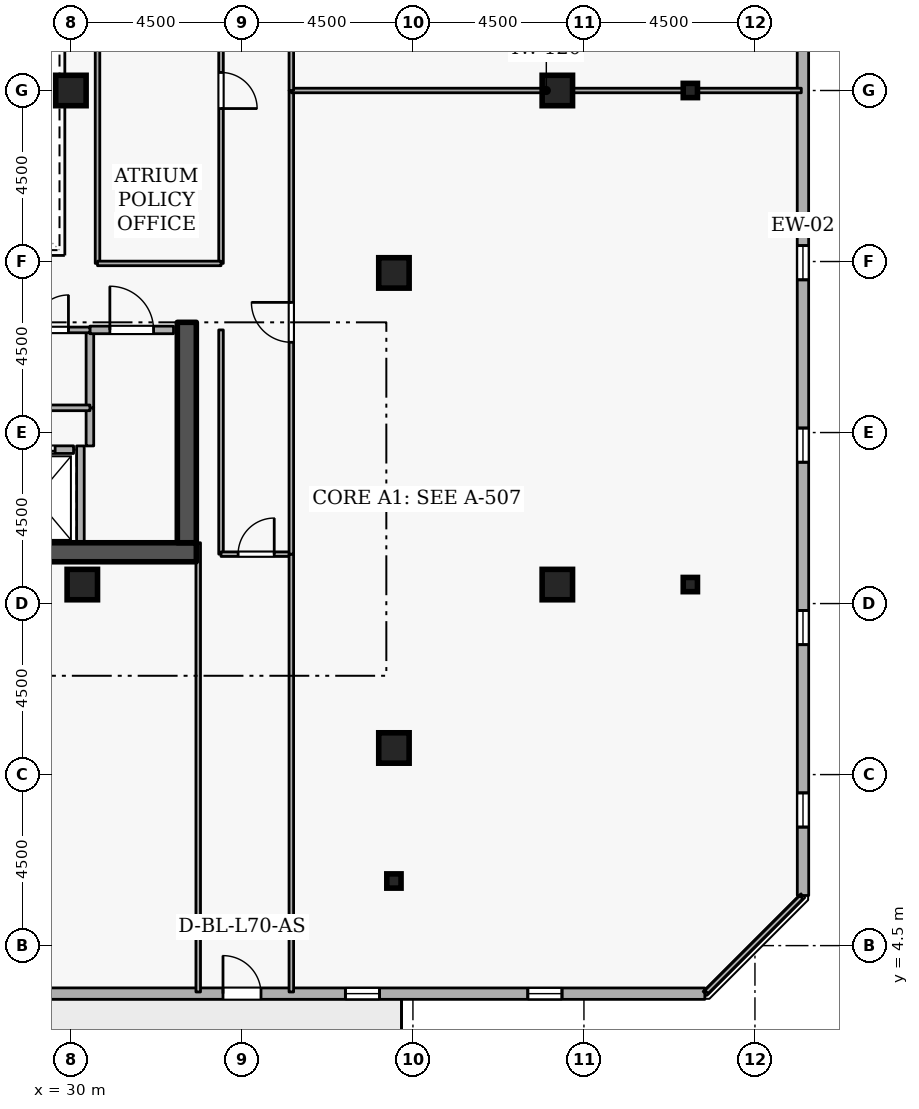
"""IFC4 building model, lengths in metres.
Left out: names, types, materials, properties, quantities, classifications, styles, units other than length and angle.
Written with IfcOpenShell. Run it as: python <this file> out.ifc"""

import sys

from ifc_helpers import new_model, si_unit, direction, frame, frame_2d, origin, origin_2d, place, context, subcontext, project, spatial, rectangle, i_section, extrude, element, fill, save


model = new_model("IFC4")
c1 = context("Model", 3, precision=1e-05, world=origin(), true_north=direction((0.0, 1.0)))
c2 = subcontext(c1, "Body", "Model", "MODEL_VIEW")
j1 = project(units=[si_unit("LENGTHUNIT", "METRE"), si_unit("PLANEANGLEUNIT", "RADIAN")], contexts=[c1])
p1 = place(None, origin())
s1 = spatial("IfcSite", under=j1, at=p1, CompositionType="ELEMENT")
p2 = place(p1, origin())
s2 = spatial("IfcBuilding", under=s1, at=p2, CompositionType="ELEMENT")
p3 = place(p2, frame((0.0, 0.0, 261.9)))
s3 = spatial("IfcBuildingStorey", under=s2, at=p3, CompositionType="ELEMENT", Elevation=261.9)
p4 = place(p3, frame((17.7, 14.85, 0.0), z_axis=(0.0, 0.0, 1.0), x_axis=(1.0, 0.0, 0.0)))
e1 = element("IfcWall", 1, at=p4, inside=s3, PredefinedType="SHEAR", context=c2, shape_type="SweptSolid", body=[
    extrude(rectangle(XDim=15.6, YDim=0.5, at=frame_2d((7.8, 0.0))), origin(), (0.0, 0.0, 1.0), 3.6),
])
p5 = place(p3, frame((33.05, 15.1, 0.0), z_axis=(0.0, 0.0, 1.0), x_axis=(0.0, 1.0, 0.0)))
e2 = element("IfcWall", 2, at=p5, inside=s3, PredefinedType="SHEAR", context=c2, shape_type="SweptSolid", body=[
    extrude(rectangle(XDim=5.8, YDim=0.5, at=frame_2d((2.9, 0.0))), origin(), (0.0, 0.0, 1.0), 3.6),
])
for number, where, z_axis, x_axis in (
    (3, (38.5, 9.7, 0.0), (0.0, 0.0, 1.0), (1.0, 0.0, 0.0)),
    (4, (42.8, 14.0, 0.0), (0.0, 0.0, 1.0), (1.0, 0.0, 0.0)),
    (5, (42.8, 27.0, 0.0), (0.0, 0.0, 1.0), (1.0, 0.0, 0.0)),
    (6, (38.5, 22.2, 0.0), (0.0, 0.0, 1.0), (1.0, 0.0, 0.0)),
    (7, (30.3, 14.0, 0.0), (0.0, 0.0, 1.0), (1.0, 0.0, 0.0)),
    (8, (30.0, 27.0, 0.0), (0.0, 0.0, 1.0), (1.0, 0.0, 0.0)),
):
    element("IfcColumn", number, at=place(p3, frame(where, z_axis=z_axis, x_axis=x_axis)), inside=s3, PredefinedType="COLUMN", context=c2, shape_type="SweptSolid", body=[
        extrude(rectangle(XDim=0.8, YDim=0.8, at=origin_2d()), origin(), (0.0, 0.0, 1.0), 3.6),
    ])
for number, where, z_axis, x_axis in (
    (9, (38.5, 6.2, 0.0), (0.0, 0.0, 1.0), (1.0, 0.0, 0.0)),
    (10, (46.3, 14.0, 0.0), (0.0, 0.0, 1.0), (1.0, 0.0, 0.0)),
    (11, (46.3, 27.0, 0.0), (0.0, 0.0, 1.0), (1.0, 0.0, 0.0)),
):
    element("IfcColumn", number, at=place(p3, frame(where, z_axis=z_axis, x_axis=x_axis)), inside=s3, PredefinedType="COLUMN", context=c2, shape_type="SweptSolid", body=[
        extrude(i_section(OverallWidth=0.375, OverallDepth=0.375, WebThickness=0.017, FlangeThickness=0.027, FilletRadius=0.015, at=origin_2d()), origin(), (0.0, 0.0, 1.0), 3.6),
    ])
p6 = place(p3, frame((11.422, 3.239, 0.0), z_axis=(0.0, 0.0, 1.0), x_axis=(0.999999994606, -0.000103863011, 0.0)))
e12 = element("IfcWall", 12, at=p6, inside=s3, PredefinedType="STANDARD", context=c2, shape_type="SweptSolid", body=[
    extrude(rectangle(XDim=35.259, YDim=0.3, at=frame_2d((17.629, 0.0))), origin(), (0.0, 0.0, 1.0), 2.7),
])
p7 = place(p6, frame((22.58, 0.0, 0.0)))
e13 = element("IfcOpeningElement", 13, at=p7, cuts=e12, PredefinedType="OPENING", context=c2, shape_type="SweptSolid", body=[
    extrude(rectangle(XDim=1.0, YDim=2.08, at=frame_2d((0.5, 1.04))), frame((0.0, 0.16, 0.0), z_axis=(0.0, -1.0, 0.0), x_axis=(1.0, 0.0, 0.0)), (0.0, 0.0, 1.0), 0.32),
])
p8 = place(p6, frame((1.8, 0.0, 0.72)))
e14 = element("IfcOpeningElement", 14, at=p8, cuts=e12, PredefinedType="OPENING", context=c2, shape_type="SweptSolid", body=[
    extrude(rectangle(XDim=0.9, YDim=1.75, at=frame_2d((0.45, 0.875))), frame((0.0, 0.16, 0.0), z_axis=(0.0, -1.0, 0.0), x_axis=(1.0, 0.0, 0.0)), (0.0, 0.0, 1.0), 0.32),
])
p9 = place(p6, frame((6.6, 0.0, 0.72)))
e15 = element("IfcOpeningElement", 15, at=p9, cuts=e12, PredefinedType="OPENING", context=c2, shape_type="SweptSolid", body=[
    extrude(rectangle(XDim=0.9, YDim=1.75, at=frame_2d((0.45, 0.875))), frame((0.0, 0.16, 0.0), z_axis=(0.0, -1.0, 0.0), x_axis=(1.0, 0.0, 0.0)), (0.0, 0.0, 1.0), 0.32),
])
p10 = place(p6, frame((11.4, 0.0, 0.72)))
e16 = element("IfcOpeningElement", 16, at=p10, cuts=e12, PredefinedType="OPENING", context=c2, shape_type="SweptSolid", body=[
    extrude(rectangle(XDim=0.9, YDim=1.75, at=frame_2d((0.45, 0.875))), frame((0.0, 0.16, 0.0), z_axis=(0.0, -1.0, 0.0), x_axis=(1.0, 0.0, 0.0)), (0.0, 0.0, 1.0), 0.32),
])
p11 = place(p6, frame((16.2, 0.0, 0.72)))
e17 = element("IfcOpeningElement", 17, at=p11, cuts=e12, PredefinedType="OPENING", context=c2, shape_type="SweptSolid", body=[
    extrude(rectangle(XDim=0.9, YDim=1.75, at=frame_2d((0.45, 0.875))), frame((0.0, 0.16, 0.0), z_axis=(0.0, -1.0, 0.0), x_axis=(1.0, 0.0, 0.0)), (0.0, 0.0, 1.0), 0.32),
])
p12 = place(p6, frame((25.8, 0.0, 0.72)))
e18 = element("IfcOpeningElement", 18, at=p12, cuts=e12, PredefinedType="OPENING", context=c2, shape_type="SweptSolid", body=[
    extrude(rectangle(XDim=0.9, YDim=1.75, at=frame_2d((0.45, 0.875))), frame((0.0, 0.16, 0.0), z_axis=(0.0, -1.0, 0.0), x_axis=(1.0, 0.0, 0.0)), (0.0, 0.0, 1.0), 0.32),
])
p13 = place(p6, frame((30.6, 0.0, 0.72)))
e19 = element("IfcOpeningElement", 19, at=p13, cuts=e12, PredefinedType="OPENING", context=c2, shape_type="SweptSolid", body=[
    extrude(rectangle(XDim=0.9, YDim=1.75, at=frame_2d((0.45, 0.875))), frame((0.0, 0.16, 0.0), z_axis=(0.0, -1.0, 0.0), x_axis=(1.0, 0.0, 0.0)), (0.0, 0.0, 1.0), 0.32),
])
p14 = place(p3, frame((49.265, 5.819, 0.0), z_axis=(0.0, 0.0, 1.0), x_axis=(-0.000103863011, 0.999999994606, 0.0)))
e20 = element("IfcWall", 20, at=p14, inside=s3, PredefinedType="STANDARD", context=c2, shape_type="SweptSolid", body=[
    extrude(rectangle(XDim=35.259, YDim=0.3, at=frame_2d((17.629, 0.0))), origin(), (0.0, 0.0, 1.0), 2.7),
])
p15 = place(p14, frame((1.8, 0.0, 0.72)))
e21 = element("IfcOpeningElement", 21, at=p15, cuts=e20, PredefinedType="OPENING", context=c2, shape_type="SweptSolid", body=[
    extrude(rectangle(XDim=0.9, YDim=1.75, at=frame_2d((0.45, 0.875))), frame((0.0, 0.16, 0.0), z_axis=(0.0, -1.0, 0.0), x_axis=(1.0, 0.0, 0.0)), (0.0, 0.0, 1.0), 0.32),
])
p16 = place(p14, frame((6.6, 0.0, 0.72)))
e22 = element("IfcOpeningElement", 22, at=p16, cuts=e20, PredefinedType="OPENING", context=c2, shape_type="SweptSolid", body=[
    extrude(rectangle(XDim=0.9, YDim=1.75, at=frame_2d((0.45, 0.875))), frame((0.0, 0.16, 0.0), z_axis=(0.0, -1.0, 0.0), x_axis=(1.0, 0.0, 0.0)), (0.0, 0.0, 1.0), 0.32),
])
p17 = place(p14, frame((11.4, 0.0, 0.72)))
e23 = element("IfcOpeningElement", 23, at=p17, cuts=e20, PredefinedType="OPENING", context=c2, shape_type="SweptSolid", body=[
    extrude(rectangle(XDim=0.9, YDim=1.75, at=frame_2d((0.45, 0.875))), frame((0.0, 0.16, 0.0), z_axis=(0.0, -1.0, 0.0), x_axis=(1.0, 0.0, 0.0)), (0.0, 0.0, 1.0), 0.32),
])
p18 = place(p14, frame((16.2, 0.0, 0.72)))
e24 = element("IfcOpeningElement", 24, at=p18, cuts=e20, PredefinedType="OPENING", context=c2, shape_type="SweptSolid", body=[
    extrude(rectangle(XDim=0.9, YDim=1.75, at=frame_2d((0.45, 0.875))), frame((0.0, 0.16, 0.0), z_axis=(0.0, -1.0, 0.0), x_axis=(1.0, 0.0, 0.0)), (0.0, 0.0, 1.0), 0.32),
])
p19 = place(p14, frame((25.8, 0.0, 0.72)))
e25 = element("IfcOpeningElement", 25, at=p19, cuts=e20, PredefinedType="OPENING", context=c2, shape_type="SweptSolid", body=[
    extrude(rectangle(XDim=0.9, YDim=1.75, at=frame_2d((0.45, 0.875))), frame((0.0, 0.16, 0.0), z_axis=(0.0, -1.0, 0.0), x_axis=(1.0, 0.0, 0.0)), (0.0, 0.0, 1.0), 0.32),
])
p20 = place(p14, frame((30.6, 0.0, 0.72)))
e26 = element("IfcOpeningElement", 26, at=p20, cuts=e20, PredefinedType="OPENING", context=c2, shape_type="SweptSolid", body=[
    extrude(rectangle(XDim=0.9, YDim=1.75, at=frame_2d((0.45, 0.875))), frame((0.0, 0.16, 0.0), z_axis=(0.0, -1.0, 0.0), x_axis=(1.0, 0.0, 0.0)), (0.0, 0.0, 1.0), 0.32),
])
p21 = place(p3, frame((28.08, 17.55, 0.0), z_axis=(0.0, 0.0, 1.0), x_axis=(1.0, 0.0, 0.0)))
e27 = element("IfcWall", 27, at=p21, inside=s3, PredefinedType="STANDARD", context=c2, shape_type="SweptSolid", body=[
    extrude(rectangle(XDim=1.99, YDim=0.2, at=frame_2d((0.995, 0.0))), origin(), (0.0, 0.0, 1.0), 3.34),
])
p22 = place(p21, frame((0.485, 0.0, 0.0)))
e28 = element("IfcOpeningElement", 28, at=p22, cuts=e27, PredefinedType="OPENING", context=c2, shape_type="SweptSolid", body=[
    extrude(rectangle(XDim=1.02, YDim=2.06, at=frame_2d((0.51, 1.03))), frame((0.0, 0.11, 0.0), z_axis=(0.0, -1.0, 0.0), x_axis=(1.0, 0.0, 0.0)), (0.0, 0.0, 1.0), 0.22),
])
p23 = place(p3, frame((30.25, 15.112, 0.0), z_axis=(0.0, 0.0, 1.0), x_axis=(0.0, 1.0, 0.0)))
e29 = element("IfcWall", 29, at=p23, inside=s3, PredefinedType="STANDARD", context=c2, shape_type="SweptSolid", body=[
    extrude(rectangle(XDim=2.536, YDim=0.2, at=frame_2d((1.268, 0.0))), origin(), (0.0, 0.0, 1.0), 3.34),
])
p24 = place(p3, frame((30.5, 17.648, 0.0), z_axis=(0.0, 0.0, 1.0), x_axis=(0.0, 1.0, 0.0)))
e30 = element("IfcWall", 30, at=p24, inside=s3, PredefinedType="STANDARD", context=c2, shape_type="SweptSolid", body=[
    extrude(rectangle(XDim=1.002, YDim=0.2, at=frame_2d((0.501, 0.0))), origin(), (0.0, 0.0, 1.0), 3.34),
])
p25 = place(p3, frame((30.5, 18.65, 0.0), z_axis=(0.0, 0.0, 1.0), x_axis=(0.0, 1.0, 0.0)))
e31 = element("IfcWall", 31, at=p25, inside=s3, PredefinedType="STANDARD", context=c2, shape_type="SweptSolid", body=[
    extrude(rectangle(XDim=2.05, YDim=0.2, at=frame_2d((1.025, 0.0))), origin(), (0.0, 0.0, 1.0), 3.34),
])
p26 = place(p3, frame((30.5, 20.7, 0.0), z_axis=(0.0, 0.0, 1.0), x_axis=(1.0, 0.0, 0.0)))
e32 = element("IfcWall", 32, at=p26, inside=s3, PredefinedType="STANDARD", context=c2, shape_type="SweptSolid", body=[
    extrude(rectangle(XDim=2.2, YDim=0.2, at=frame_2d((1.1, 0.0))), origin(), (0.0, 0.0, 1.0), 3.34),
])
p27 = place(p26, frame((0.525, 0.0, 0.0)))
e33 = element("IfcOpeningElement", 33, at=p27, cuts=e32, PredefinedType="OPENING", context=c2, shape_type="SweptSolid", body=[
    extrude(rectangle(XDim=1.15, YDim=2.1, at=frame_2d((0.575, 1.05))), frame((0.0, 0.11, 0.0), z_axis=(0.0, -1.0, 0.0), x_axis=(1.0, 0.0, 0.0)), (0.0, 0.0, 1.0), 0.22),
])
p28 = place(p3, frame((30.5, 18.65, 0.0), z_axis=(0.0, 0.0, 1.0), x_axis=(-1.0, 0.0, 0.0)))
e34 = element("IfcWall", 34, at=p28, inside=s3, PredefinedType="PARTITIONING", context=c2, shape_type="SweptSolid", body=[
    extrude(rectangle(XDim=2.05, YDim=0.15, at=frame_2d((1.025, 0.0))), origin(), (0.0, 0.0, 1.0), 3.34),
])
p29 = place(p3, frame((28.45, 20.7, 0.0), z_axis=(0.0, 0.0, 1.0), x_axis=(1.0, 0.0, 0.0)))
e35 = element("IfcWall", 35, at=p29, inside=s3, PredefinedType="PARTITIONING", context=c2, shape_type="SweptSolid", body=[
    extrude(rectangle(XDim=2.05, YDim=0.15, at=frame_2d((1.025, 0.0))), origin(), (0.0, 0.0, 1.0), 3.34),
])
p30 = place(p29, frame((0.565, 0.0, 0.0)))
e36 = element("IfcOpeningElement", 36, at=p30, cuts=e35, PredefinedType="OPENING", context=c2, shape_type="SweptSolid", body=[
    extrude(rectangle(XDim=0.92, YDim=2.08, at=frame_2d((0.46, 1.04))), frame((0.0, 0.085, 0.0), z_axis=(0.0, -1.0, 0.0), x_axis=(1.0, 0.0, 0.0)), (0.0, 0.0, 1.0), 0.17),
])
p31 = place(p3, frame((33.95, 20.7, 0.0), z_axis=(0.0, 0.0, 1.0), x_axis=(0.0, -1.0, 0.0)))
e37 = element("IfcWall", 37, at=p31, inside=s3, PredefinedType="PARTITIONING", context=c2, shape_type="SweptSolid", body=[
    extrude(rectangle(XDim=5.9, YDim=0.12, at=frame_2d((2.95, 0.0))), origin(), (0.0, 0.0, 1.0), 3.34),
])
p32 = place(p3, frame((33.95, 14.8, 0.0), z_axis=(0.0, 0.0, 1.0), x_axis=(1.0, 0.0, 0.0)))
e38 = element("IfcWall", 38, at=p32, inside=s3, PredefinedType="PARTITIONING", context=c2, shape_type="SweptSolid", body=[
    extrude(rectangle(XDim=1.85, YDim=0.12, at=frame_2d((0.925, 0.0))), origin(), (0.0, 0.0, 1.0), 3.34),
])
p33 = place(p32, frame((0.45, 0.0, 0.0)))
e39 = element("IfcOpeningElement", 39, at=p33, cuts=e38, PredefinedType="OPENING", context=c2, shape_type="SweptSolid", body=[
    extrude(rectangle(XDim=0.95, YDim=2.1, at=frame_2d((0.475, 1.05))), frame((0.0, 0.07, 0.0), z_axis=(0.0, -1.0, 0.0), x_axis=(1.0, 0.0, 0.0)), (0.0, 0.0, 1.0), 0.14),
])
p34 = place(p3, frame((35.8, 14.8, 0.0), z_axis=(0.0, 0.0, 1.0), x_axis=(0.0, -1.0, 0.0)))
e40 = element("IfcWall", 40, at=p34, inside=s3, PredefinedType="PARTITIONING", context=c2, shape_type="SweptSolid", body=[
    extrude(rectangle(XDim=11.52, YDim=0.12, at=frame_2d((5.76, 0.0))), origin(), (0.0, 0.0, 1.0), 3.34),
])
p35 = place(p3, frame((33.35, 3.28, 0.0), z_axis=(0.0, 0.0, 1.0), x_axis=(0.0, 1.0, 0.0)))
e41 = element("IfcWall", 41, at=p35, inside=s3, PredefinedType="PARTITIONING", context=c2, shape_type="SweptSolid", body=[
    extrude(rectangle(XDim=11.82, YDim=0.12, at=frame_2d((5.91, 0.0))), origin(), (0.0, 0.0, 1.0), 2.545),
])
p36 = place(p3, frame((35.8, 14.8, 0.0), z_axis=(0.0, 0.0, 1.0), x_axis=(0.0, 1.0, 0.0)))
e42 = element("IfcWall", 42, at=p36, inside=s3, PredefinedType="PARTITIONING", context=c2, shape_type="SweptSolid", body=[
    extrude(rectangle(XDim=12.2, YDim=0.12, at=frame_2d((6.1, 0.0))), origin(), (0.0, 0.0, 1.0), 3.34),
])
p37 = place(p36, frame((5.575, 0.0, 0.0)))
e43 = element("IfcOpeningElement", 43, at=p37, cuts=e42, PredefinedType="OPENING", context=c2, shape_type="SweptSolid", body=[
    extrude(rectangle(XDim=1.05, YDim=2.1, at=frame_2d((0.525, 1.05))), frame((0.0, 0.07, 0.0), z_axis=(0.0, -1.0, 0.0), x_axis=(1.0, 0.0, 0.0)), (0.0, 0.0, 1.0), 0.14),
])
p38 = place(p3, frame((35.8, 27.0, 0.0), z_axis=(0.0, 0.0, 1.0), x_axis=(1.0, 0.0, 0.0)))
e44 = element("IfcWall", 44, at=p38, inside=s3, PredefinedType="PARTITIONING", context=c2, shape_type="SweptSolid", body=[
    extrude(rectangle(XDim=13.42, YDim=0.12, at=frame_2d((6.71, 0.0))), origin(), (0.0, 0.0, 1.0), 2.932),
])
p39 = place(p3, frame((49.22, 5.775, 0.0), z_axis=(0.0, 0.0, 1.0), x_axis=(-0.707106781187, -0.707106781187, 0.0)))
e45 = element("IfcWall", 45, at=p39, inside=s3, PredefinedType="PARTITIONING", context=c2, shape_type="SweptSolid", body=[
    extrude(rectangle(XDim=3.528, YDim=0.12, at=frame_2d((1.764, 0.0))), origin(), (0.0, 0.0, 1.0), 3.34),
])
p40 = place(p3, frame((35.8, 27.0, 0.0), z_axis=(0.0, 0.0, 1.0), x_axis=(0.0, 1.0, 0.0)))
e46 = element("IfcWall", 46, at=p40, inside=s3, PredefinedType="PARTITIONING", context=c2, shape_type="SweptSolid", body=[
    extrude(rectangle(XDim=6.3, YDim=0.12, at=frame_2d((3.15, 0.0))), origin(), (0.0, 0.0, 1.0), 3.34),
])
p41 = place(p40, frame((2.625, 0.0, 0.0)))
e47 = element("IfcOpeningElement", 47, at=p41, cuts=e46, PredefinedType="OPENING", context=c2, shape_type="SweptSolid", body=[
    extrude(rectangle(XDim=1.05, YDim=2.1, at=frame_2d((0.525, 1.05))), frame((0.0, 0.07, 0.0), z_axis=(0.0, -1.0, 0.0), x_axis=(1.0, 0.0, 0.0)), (0.0, 0.0, 1.0), 0.14),
])
p42 = place(p3, frame((30.7, 22.45, 0.0), z_axis=(0.0, 0.0, 1.0), x_axis=(0.0, 1.0, 0.0)))
e48 = element("IfcWall", 48, at=p42, inside=s3, PredefinedType="PARTITIONING", context=c2, shape_type="SweptSolid", body=[
    extrude(rectangle(XDim=9.1, YDim=0.12, at=frame_2d((4.55, 0.0))), origin(), (0.0, 0.0, 1.0), 3.34),
])
p43 = place(p3, frame((33.95, 31.55, 0.0), z_axis=(0.0, 0.0, 1.0), x_axis=(0.0, -1.0, 0.0)))
e49 = element("IfcWall", 49, at=p43, inside=s3, PredefinedType="PARTITIONING", context=c2, shape_type="SweptSolid", body=[
    extrude(rectangle(XDim=9.1, YDim=0.12, at=frame_2d((4.55, 0.0))), origin(), (0.0, 0.0, 1.0), 3.34),
])
p44 = place(p43, frame((4.075, 0.0, 0.0)))
e50 = element("IfcOpeningElement", 50, at=p44, cuts=e49, PredefinedType="OPENING", context=c2, shape_type="SweptSolid", body=[
    extrude(rectangle(XDim=0.95, YDim=2.1, at=frame_2d((0.475, 1.05))), frame((0.0, 0.07, 0.0), z_axis=(0.0, -1.0, 0.0), x_axis=(1.0, 0.0, 0.0)), (0.0, 0.0, 1.0), 0.14),
])
p45 = place(p3, frame((33.95, 22.45, 0.0), z_axis=(0.0, 0.0, 1.0), x_axis=(-1.0, 0.0, 0.0)))
e51 = element("IfcWall", 51, at=p45, inside=s3, PredefinedType="PARTITIONING", context=c2, shape_type="SweptSolid", body=[
    extrude(rectangle(XDim=3.25, YDim=0.12, at=frame_2d((1.625, 0.0))), origin(), (0.0, 0.0, 1.0), 3.34),
])
p46 = place(p7, origin())
e52 = element("IfcDoor", 52, at=p46, inside=s3, OperationType="SINGLE_SWING_LEFT", PredefinedType="DOOR", context=c2, shape_type="SweptSolid", body=[
    extrude(rectangle(XDim=1.0, YDim=2.08, at=frame_2d((0.5, 1.04))), frame((0.0, 0.025, 0.0), z_axis=(0.0, -1.0, 0.0), x_axis=(1.0, 0.0, 0.0)), (0.0, 0.0, 1.0), 0.05),
])
fill(e13, e52)
p47 = place(p12, origin())
e53 = element("IfcWindow", 53, at=p47, inside=s3, PartitioningType="SINGLE_PANEL", PredefinedType="WINDOW", context=c2, shape_type="SweptSolid", body=[
    extrude(rectangle(XDim=0.9, YDim=1.75, at=frame_2d((0.45, 0.875))), frame((0.0, 0.03, 0.0), z_axis=(0.0, -1.0, 0.0), x_axis=(1.0, 0.0, 0.0)), (0.0, 0.0, 1.0), 0.06),
])
fill(e18, e53)
p48 = place(p13, origin())
e54 = element("IfcWindow", 54, at=p48, inside=s3, PartitioningType="SINGLE_PANEL", PredefinedType="WINDOW", context=c2, shape_type="SweptSolid", body=[
    extrude(rectangle(XDim=0.9, YDim=1.75, at=frame_2d((0.45, 0.875))), frame((0.0, 0.03, 0.0), z_axis=(0.0, -1.0, 0.0), x_axis=(1.0, 0.0, 0.0)), (0.0, 0.0, 1.0), 0.06),
])
fill(e19, e54)
p49 = place(p15, origin())
e55 = element("IfcWindow", 55, at=p49, inside=s3, PartitioningType="SINGLE_PANEL", PredefinedType="WINDOW", context=c2, shape_type="SweptSolid", body=[
    extrude(rectangle(XDim=0.9, YDim=1.75, at=frame_2d((0.45, 0.875))), frame((0.0, 0.03, 0.0), z_axis=(0.0, -1.0, 0.0), x_axis=(1.0, 0.0, 0.0)), (0.0, 0.0, 1.0), 0.06),
])
fill(e21, e55)
p50 = place(p16, origin())
e56 = element("IfcWindow", 56, at=p50, inside=s3, PartitioningType="SINGLE_PANEL", PredefinedType="WINDOW", context=c2, shape_type="SweptSolid", body=[
    extrude(rectangle(XDim=0.9, YDim=1.75, at=frame_2d((0.45, 0.875))), frame((0.0, 0.03, 0.0), z_axis=(0.0, -1.0, 0.0), x_axis=(1.0, 0.0, 0.0)), (0.0, 0.0, 1.0), 0.06),
])
fill(e22, e56)
p51 = place(p17, origin())
e57 = element("IfcWindow", 57, at=p51, inside=s3, PartitioningType="SINGLE_PANEL", PredefinedType="WINDOW", context=c2, shape_type="SweptSolid", body=[
    extrude(rectangle(XDim=0.9, YDim=1.75, at=frame_2d((0.45, 0.875))), frame((0.0, 0.03, 0.0), z_axis=(0.0, -1.0, 0.0), x_axis=(1.0, 0.0, 0.0)), (0.0, 0.0, 1.0), 0.06),
])
fill(e23, e57)
p52 = place(p18, origin())
e58 = element("IfcWindow", 58, at=p52, inside=s3, PartitioningType="SINGLE_PANEL", PredefinedType="WINDOW", context=c2, shape_type="SweptSolid", body=[
    extrude(rectangle(XDim=0.9, YDim=1.75, at=frame_2d((0.45, 0.875))), frame((0.0, 0.03, 0.0), z_axis=(0.0, -1.0, 0.0), x_axis=(1.0, 0.0, 0.0)), (0.0, 0.0, 1.0), 0.06),
])
fill(e24, e58)
p53 = place(p22, origin())
e59 = element("IfcDoor", 59, at=p53, inside=s3, OperationType="SLIDING_TO_LEFT", PredefinedType="DOOR", context=c2, shape_type="SweptSolid", body=[
    extrude(rectangle(XDim=1.02, YDim=2.06, at=frame_2d((0.51, 1.03))), frame((0.0, 0.025, 0.0), z_axis=(0.0, -1.0, 0.0), x_axis=(1.0, 0.0, 0.0)), (0.0, 0.0, 1.0), 0.05),
])
fill(e28, e59)
p54 = place(p30, origin())
e60 = element("IfcDoor", 60, at=p54, inside=s3, OperationType="SINGLE_SWING_RIGHT", PredefinedType="DOOR", context=c2, shape_type="SweptSolid", body=[
    extrude(rectangle(XDim=0.92, YDim=2.08, at=frame_2d((0.46, 1.04))), frame((0.0, 0.025, 0.0), z_axis=(0.0, -1.0, 0.0), x_axis=(1.0, 0.0, 0.0)), (0.0, 0.0, 1.0), 0.05),
])
fill(e36, e60)
p55 = place(p27, origin())
e61 = element("IfcDoor", 61, at=p55, inside=s3, OperationType="SINGLE_SWING_LEFT", PredefinedType="DOOR", context=c2, shape_type="SweptSolid", body=[
    extrude(rectangle(XDim=1.15, YDim=2.1, at=frame_2d((0.575, 1.05))), frame((0.0, 0.025, 0.0), z_axis=(0.0, -1.0, 0.0), x_axis=(1.0, 0.0, 0.0)), (0.0, 0.0, 1.0), 0.05),
])
fill(e33, e61)
p56 = place(p33, origin())
e62 = element("IfcDoor", 62, at=p56, inside=s3, OperationType="SINGLE_SWING_RIGHT", PredefinedType="DOOR", context=c2, shape_type="SweptSolid", body=[
    extrude(rectangle(XDim=0.95, YDim=2.1, at=frame_2d((0.475, 1.05))), frame((0.0, 0.025, 0.0), z_axis=(0.0, -1.0, 0.0), x_axis=(1.0, 0.0, 0.0)), (0.0, 0.0, 1.0), 0.05),
])
fill(e39, e62)
p57 = place(p37, origin())
e63 = element("IfcDoor", 63, at=p57, inside=s3, OperationType="SINGLE_SWING_RIGHT", PredefinedType="DOOR", context=c2, shape_type="SweptSolid", body=[
    extrude(rectangle(XDim=1.05, YDim=2.1, at=frame_2d((0.525, 1.05))), frame((0.0, 0.025, 0.0), z_axis=(0.0, -1.0, 0.0), x_axis=(1.0, 0.0, 0.0)), (0.0, 0.0, 1.0), 0.05),
])
fill(e43, e63)
p58 = place(p44, origin())
e64 = element("IfcDoor", 64, at=p58, inside=s3, OperationType="SINGLE_SWING_RIGHT", PredefinedType="DOOR", context=c2, shape_type="SweptSolid", body=[
    extrude(rectangle(XDim=0.95, YDim=2.1, at=frame_2d((0.475, 1.05))), frame((0.0, 0.025, 0.0), z_axis=(0.0, -1.0, 0.0), x_axis=(1.0, 0.0, 0.0)), (0.0, 0.0, 1.0), 0.05),
])
fill(e50, e64)
save(model, sys.argv[1])
